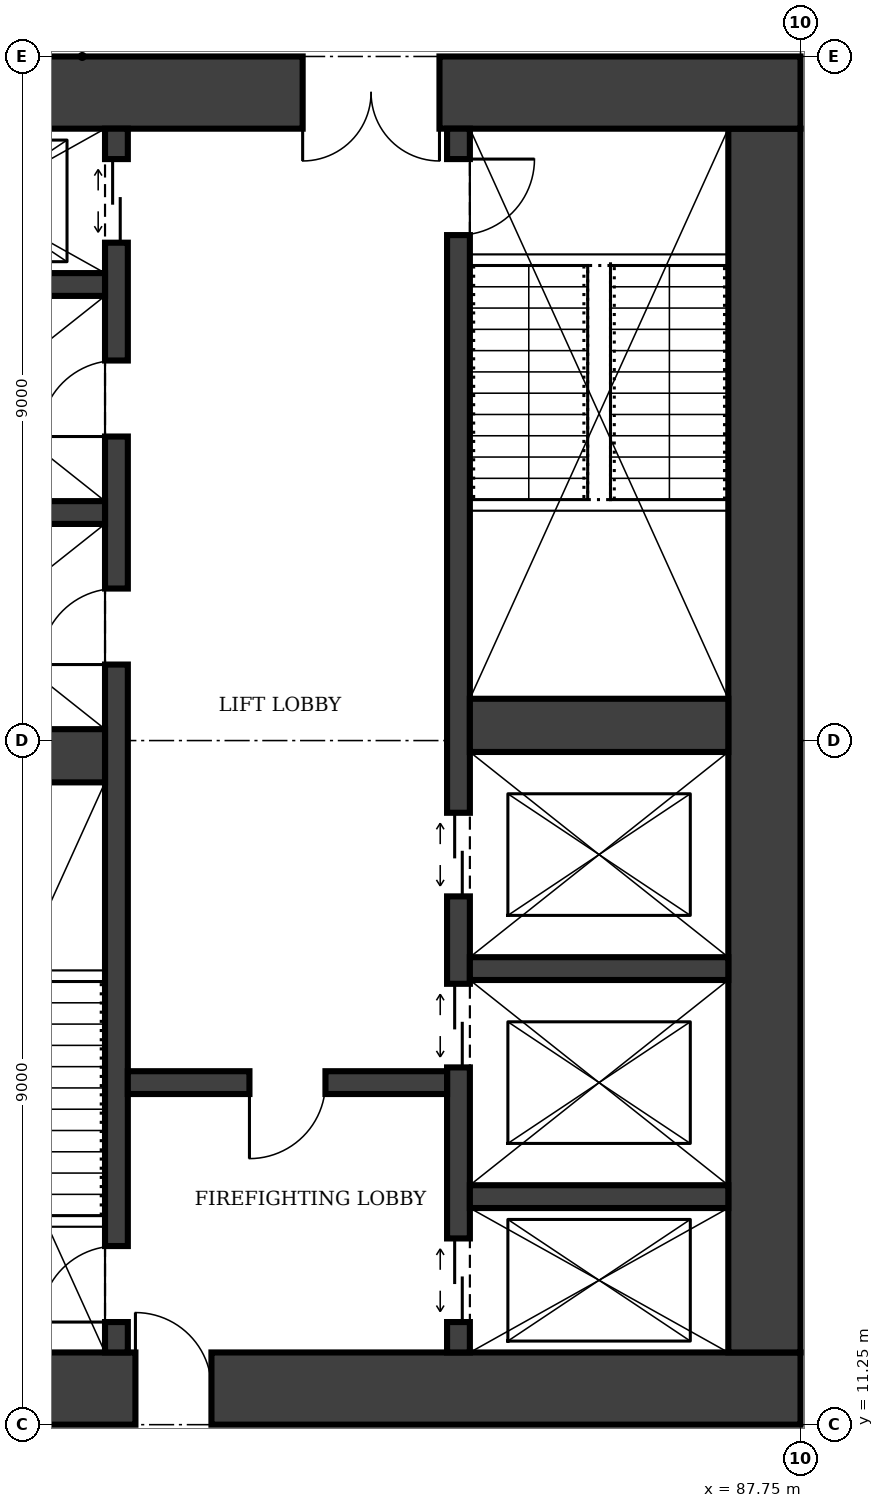
"""IFC4 building model, lengths in metres.
Left out: names, types, materials, properties, quantities, classifications, styles, units other than length and angle.
Written with IfcOpenShell. Run it as: python <this file> out.ifc"""

import sys

from ifc_helpers import new_model, si_unit, direction, frame, frame_2d, origin, place, context, subcontext, project, spatial, rectangle, extrude, element, fill, save


model = new_model("IFC4")
c1 = context("Model", 3, precision=1e-05, world=origin(), true_north=direction((0.0, 1.0)))
c2 = subcontext(c1, "Body", "Model", "MODEL_VIEW")
j1 = project(units=[si_unit("LENGTHUNIT", "METRE"), si_unit("PLANEANGLEUNIT", "RADIAN")], contexts=[c1])
p1 = place(None, origin())
s1 = spatial("IfcSite", under=j1, at=p1, CompositionType="ELEMENT")
p2 = place(p1, origin())
s2 = spatial("IfcBuilding", under=s1, at=p2, CompositionType="ELEMENT")
p3 = place(p2, frame((0.0, 0.0, 217.0)))
s3 = spatial("IfcBuildingStorey", under=s2, at=p3, CompositionType="ELEMENT", Elevation=217.0)
p4 = place(p3, frame((74.25, 11.725, 0.0), z_axis=(0.0, 0.0, 1.0), x_axis=(1.0, 0.0, 0.0)))
e1 = element("IfcWall", 1, at=p4, inside=s3, PredefinedType="SHEAR", context=c2, shape_type="SweptSolid", body=[
    extrude(rectangle(XDim=13.5, YDim=0.95, at=frame_2d((6.75, 0.0))), origin(), (0.0, 0.0, 1.0), 4.0),
])
p5 = place(p4, frame((4.75, 0.0, 0.0)))
e2 = element("IfcOpeningElement", 2, at=p5, cuts=e1, PredefinedType="OPENING", context=c2, shape_type="SweptSolid", body=[
    extrude(rectangle(XDim=1.0, YDim=2.1, at=frame_2d((0.5, 1.05))), frame((0.0, 0.485, 0.0), z_axis=(0.0, -1.0, 0.0), x_axis=(1.0, 0.0, 0.0)), (0.0, 0.0, 1.0), 0.97),
])
p6 = place(p3, frame((87.275, 12.2, 0.0), z_axis=(0.0, 0.0, 1.0), x_axis=(0.0, 1.0, 0.0)))
e3 = element("IfcWall", 3, at=p6, inside=s3, PredefinedType="SHEAR", context=c2, shape_type="SweptSolid", body=[
    extrude(rectangle(XDim=16.1, YDim=0.95, at=frame_2d((8.05, 0.0))), origin(), (0.0, 0.0, 1.0), 4.0),
])
p7 = place(p3, frame((87.75, 28.775, 0.0), z_axis=(0.0, 0.0, 1.0), x_axis=(-1.0, 0.0, 0.0)))
e4 = element("IfcWall", 4, at=p7, inside=s3, PredefinedType="SHEAR", context=c2, shape_type="SweptSolid", body=[
    extrude(rectangle(XDim=13.5, YDim=0.95, at=frame_2d((6.75, 0.0))), origin(), (0.0, 0.0, 1.0), 4.0),
])
p8 = place(p7, frame((4.75, 0.0, 0.0)))
e5 = element("IfcOpeningElement", 5, at=p8, cuts=e4, PredefinedType="OPENING", context=c2, shape_type="SweptSolid", body=[
    extrude(rectangle(XDim=1.8, YDim=2.1, at=frame_2d((0.9, 1.05))), frame((0.0, 0.485, 0.0), z_axis=(0.0, -1.0, 0.0), x_axis=(1.0, 0.0, 0.0)), (0.0, 0.0, 1.0), 0.97),
])
p9 = place(p3, frame((78.75, 12.2, 0.0), z_axis=(0.0, 0.0, 1.0), x_axis=(0.0, 1.0, 0.0)))
e6 = element("IfcWall", 6, at=p9, inside=s3, PredefinedType="SHEAR", context=c2, shape_type="SweptSolid", body=[
    extrude(rectangle(XDim=16.1, YDim=0.3, at=frame_2d((8.05, 0.0))), origin(), (0.0, 0.0, 1.0), 4.0),
])
p10 = place(p9, frame((0.4, 0.0, 0.0)))
e7 = element("IfcOpeningElement", 7, at=p10, cuts=e6, PredefinedType="OPENING", context=c2, shape_type="SweptSolid", body=[
    extrude(rectangle(XDim=1.0, YDim=2.1, at=frame_2d((0.5, 1.05))), frame((0.0, 0.16, 0.0), z_axis=(0.0, -1.0, 0.0), x_axis=(1.0, 0.0, 0.0)), (0.0, 0.0, 1.0), 0.32),
])
p11 = place(p9, frame((14.6, 0.0, 0.0)))
e8 = element("IfcOpeningElement", 8, at=p11, cuts=e6, PredefinedType="OPENING", context=c2, shape_type="SweptSolid", body=[
    extrude(rectangle(XDim=1.1, YDim=2.1, at=frame_2d((0.55, 1.05))), frame((0.0, 0.16, 0.0), z_axis=(0.0, -1.0, 0.0), x_axis=(1.0, 0.0, 0.0)), (0.0, 0.0, 1.0), 0.32),
])
p12 = place(p9, frame((9.05, 0.0, 0.0)))
e9 = element("IfcOpeningElement", 9, at=p12, cuts=e6, PredefinedType="OPENING", context=c2, shape_type="SweptSolid", body=[
    extrude(rectangle(XDim=1.0, YDim=2.1, at=frame_2d((0.5, 1.05))), frame((0.0, 0.16, 0.0), z_axis=(0.0, -1.0, 0.0), x_axis=(1.0, 0.0, 0.0)), (0.0, 0.0, 1.0), 0.32),
])
p13 = place(p9, frame((12.05, 0.0, 0.0)))
e10 = element("IfcOpeningElement", 10, at=p13, cuts=e6, PredefinedType="OPENING", context=c2, shape_type="SweptSolid", body=[
    extrude(rectangle(XDim=1.0, YDim=2.1, at=frame_2d((0.5, 1.05))), frame((0.0, 0.16, 0.0), z_axis=(0.0, -1.0, 0.0), x_axis=(1.0, 0.0, 0.0)), (0.0, 0.0, 1.0), 0.32),
])
p14 = place(p3, frame((83.25, 12.2, 0.0), z_axis=(0.0, 0.0, 1.0), x_axis=(0.0, 1.0, 0.0)))
e11 = element("IfcWall", 11, at=p14, inside=s3, PredefinedType="SHEAR", context=c2, shape_type="SweptSolid", body=[
    extrude(rectangle(XDim=16.1, YDim=0.3, at=frame_2d((8.05, 0.0))), origin(), (0.0, 0.0, 1.0), 4.0),
])
p15 = place(p14, frame((14.7, 0.0, 0.0)))
e12 = element("IfcOpeningElement", 12, at=p15, cuts=e11, PredefinedType="OPENING", context=c2, shape_type="SweptSolid", body=[
    extrude(rectangle(XDim=1.0, YDim=2.1, at=frame_2d((0.5, 1.05))), frame((0.0, 0.16, 0.0), z_axis=(0.0, -1.0, 0.0), x_axis=(1.0, 0.0, 0.0)), (0.0, 0.0, 1.0), 0.32),
])
p16 = place(p14, frame((0.4, 0.0, 0.0)))
e13 = element("IfcOpeningElement", 13, at=p16, cuts=e11, PredefinedType="OPENING", context=c2, shape_type="SweptSolid", body=[
    extrude(rectangle(XDim=1.1, YDim=2.1, at=frame_2d((0.55, 1.05))), frame((0.0, 0.16, 0.0), z_axis=(0.0, -1.0, 0.0), x_axis=(1.0, 0.0, 0.0)), (0.0, 0.0, 1.0), 0.32),
])
p17 = place(p14, frame((3.75, 0.0, 0.0)))
e14 = element("IfcOpeningElement", 14, at=p17, cuts=e11, PredefinedType="OPENING", context=c2, shape_type="SweptSolid", body=[
    extrude(rectangle(XDim=1.1, YDim=2.1, at=frame_2d((0.55, 1.05))), frame((0.0, 0.16, 0.0), z_axis=(0.0, -1.0, 0.0), x_axis=(1.0, 0.0, 0.0)), (0.0, 0.0, 1.0), 0.32),
])
p18 = place(p14, frame((6.0, 0.0, 0.0)))
e15 = element("IfcOpeningElement", 15, at=p18, cuts=e11, PredefinedType="OPENING", context=c2, shape_type="SweptSolid", body=[
    extrude(rectangle(XDim=1.1, YDim=2.1, at=frame_2d((0.55, 1.05))), frame((0.0, 0.16, 0.0), z_axis=(0.0, -1.0, 0.0), x_axis=(1.0, 0.0, 0.0)), (0.0, 0.0, 1.0), 0.32),
])
p19 = place(p3, frame((75.2, 20.05, 0.0), z_axis=(0.0, 0.0, 1.0), x_axis=(1.0, 0.0, 0.0)))
e16 = element("IfcWall", 16, at=p19, inside=s3, PredefinedType="SHEAR", context=c2, shape_type="SweptSolid", body=[
    extrude(rectangle(XDim=3.4, YDim=0.7, at=frame_2d((1.7, 0.0))), origin(), (0.0, 0.0, 1.0), 4.0),
])
p20 = place(p3, frame((78.9, 15.75, 0.0), z_axis=(0.0, 0.0, 1.0), x_axis=(1.0, 0.0, 0.0)))
e17 = element("IfcWall", 17, at=p20, inside=s3, PredefinedType="SHEAR", context=c2, shape_type="SweptSolid", body=[
    extrude(rectangle(XDim=4.2, YDim=0.3, at=frame_2d((2.1, 0.0))), origin(), (0.0, 0.0, 1.0), 4.0),
])
p21 = place(p20, frame((1.6, 0.0, 0.0)))
e18 = element("IfcOpeningElement", 18, at=p21, cuts=e17, PredefinedType="OPENING", context=c2, shape_type="SweptSolid", body=[
    extrude(rectangle(XDim=1.0, YDim=2.1, at=frame_2d((0.5, 1.05))), frame((0.0, 0.16, 0.0), z_axis=(0.0, -1.0, 0.0), x_axis=(1.0, 0.0, 0.0)), (0.0, 0.0, 1.0), 0.32),
])
for number, where, z_axis, x_axis in (
    (19, (83.4, 14.25, 0.0), (0.0, 0.0, 1.0), (1.0, 0.0, 0.0)),
    (20, (83.4, 17.25, 0.0), (0.0, 0.0, 1.0), (1.0, 0.0, 0.0)),
):
    element("IfcWall", number, at=place(p3, frame(where, z_axis=z_axis, x_axis=x_axis)), inside=s3, PredefinedType="SHEAR", context=c2, shape_type="SweptSolid", body=[
        extrude(rectangle(XDim=3.4, YDim=0.3, at=frame_2d((1.7, 0.0))), origin(), (0.0, 0.0, 1.0), 4.0),
    ])
p22 = place(p3, frame((83.4, 20.45, 0.0), z_axis=(0.0, 0.0, 1.0), x_axis=(1.0, 0.0, 0.0)))
e21 = element("IfcWall", 21, at=p22, inside=s3, PredefinedType="SHEAR", context=c2, shape_type="SweptSolid", body=[
    extrude(rectangle(XDim=3.4, YDim=0.7, at=frame_2d((1.7, 0.0))), origin(), (0.0, 0.0, 1.0), 4.0),
])
for number, where, z_axis, x_axis in (
    (22, (75.2, 23.25, 0.0), (0.0, 0.0, 1.0), (1.0, 0.0, 0.0)),
    (23, (75.2, 26.25, 0.0), (0.0, 0.0, 1.0), (1.0, 0.0, 0.0)),
):
    element("IfcWall", number, at=place(p3, frame(where, z_axis=z_axis, x_axis=x_axis)), inside=s3, PredefinedType="SHEAR", context=c2, shape_type="SweptSolid", body=[
        extrude(rectangle(XDim=3.4, YDim=0.3, at=frame_2d((1.7, 0.0))), origin(), (0.0, 0.0, 1.0), 4.0),
    ])
p23 = place(p5, origin())
e24 = element("IfcDoor", 24, at=p23, inside=s3, OperationType="SINGLE_SWING_LEFT", PredefinedType="DOOR", context=c2, shape_type="SweptSolid", body=[
    extrude(rectangle(XDim=1.0, YDim=2.1, at=frame_2d((0.5, 1.05))), frame((0.0, 0.025, 0.0), z_axis=(0.0, -1.0, 0.0), x_axis=(1.0, 0.0, 0.0)), (0.0, 0.0, 1.0), 0.05),
])
fill(e2, e24)
p24 = place(p8, origin())
e25 = element("IfcDoor", 25, at=p24, inside=s3, OperationType="DOUBLE_DOOR_SINGLE_SWING", PredefinedType="DOOR", context=c2, shape_type="SweptSolid", body=[
    extrude(rectangle(XDim=1.8, YDim=2.1, at=frame_2d((0.9, 1.05))), frame((0.0, 0.025, 0.0), z_axis=(0.0, -1.0, 0.0), x_axis=(1.0, 0.0, 0.0)), (0.0, 0.0, 1.0), 0.05),
])
fill(e5, e25)
p25 = place(p21, frame((1.0, 0.0, 0.0), z_axis=(0.0, 0.0, 1.0), x_axis=(-1.0, 0.0, 0.0)))
e26 = element("IfcDoor", 26, at=p25, inside=s3, OperationType="SINGLE_SWING_RIGHT", PredefinedType="DOOR", context=c2, shape_type="SweptSolid", body=[
    extrude(rectangle(XDim=1.0, YDim=2.1, at=frame_2d((0.5, 1.05))), frame((0.0, 0.025, 0.0), z_axis=(0.0, -1.0, 0.0), x_axis=(1.0, 0.0, 0.0)), (0.0, 0.0, 1.0), 0.05),
])
fill(e18, e26)
p26 = place(p10, origin())
e27 = element("IfcDoor", 27, at=p26, inside=s3, OperationType="SINGLE_SWING_LEFT", PredefinedType="DOOR", context=c2, shape_type="SweptSolid", body=[
    extrude(rectangle(XDim=1.0, YDim=2.1, at=frame_2d((0.5, 1.05))), frame((0.0, 0.025, 0.0), z_axis=(0.0, -1.0, 0.0), x_axis=(1.0, 0.0, 0.0)), (0.0, 0.0, 1.0), 0.05),
])
fill(e7, e27)
p27 = place(p15, frame((1.0, 0.0, 0.0), z_axis=(0.0, 0.0, 1.0), x_axis=(-1.0, 0.0, 0.0)))
e28 = element("IfcDoor", 28, at=p27, inside=s3, OperationType="SINGLE_SWING_LEFT", PredefinedType="DOOR", context=c2, shape_type="SweptSolid", body=[
    extrude(rectangle(XDim=1.0, YDim=2.1, at=frame_2d((0.5, 1.05))), frame((0.0, 0.025, 0.0), z_axis=(0.0, -1.0, 0.0), x_axis=(1.0, 0.0, 0.0)), (0.0, 0.0, 1.0), 0.05),
])
fill(e12, e28)
p28 = place(p16, origin())
e29 = element("IfcDoor", 29, at=p28, inside=s3, OperationType="DOUBLE_DOOR_SLIDING", PredefinedType="DOOR", context=c2, shape_type="SweptSolid", body=[
    extrude(rectangle(XDim=1.1, YDim=2.1, at=frame_2d((0.55, 1.05))), frame((0.0, 0.025, 0.0), z_axis=(0.0, -1.0, 0.0), x_axis=(1.0, 0.0, 0.0)), (0.0, 0.0, 1.0), 0.05),
])
fill(e13, e29)
p29 = place(p11, origin())
e30 = element("IfcDoor", 30, at=p29, inside=s3, OperationType="DOUBLE_DOOR_SLIDING", PredefinedType="DOOR", context=c2, shape_type="SweptSolid", body=[
    extrude(rectangle(XDim=1.1, YDim=2.1, at=frame_2d((0.55, 1.05))), frame((0.0, 0.025, 0.0), z_axis=(0.0, -1.0, 0.0), x_axis=(1.0, 0.0, 0.0)), (0.0, 0.0, 1.0), 0.05),
])
fill(e8, e30)
p30 = place(p17, origin())
e31 = element("IfcDoor", 31, at=p30, inside=s3, OperationType="DOUBLE_DOOR_SLIDING", PredefinedType="DOOR", context=c2, shape_type="SweptSolid", body=[
    extrude(rectangle(XDim=1.1, YDim=2.1, at=frame_2d((0.55, 1.05))), frame((0.0, 0.025, 0.0), z_axis=(0.0, -1.0, 0.0), x_axis=(1.0, 0.0, 0.0)), (0.0, 0.0, 1.0), 0.05),
])
fill(e14, e31)
p31 = place(p18, origin())
e32 = element("IfcDoor", 32, at=p31, inside=s3, OperationType="DOUBLE_DOOR_SLIDING", PredefinedType="DOOR", context=c2, shape_type="SweptSolid", body=[
    extrude(rectangle(XDim=1.1, YDim=2.1, at=frame_2d((0.55, 1.05))), frame((0.0, 0.025, 0.0), z_axis=(0.0, -1.0, 0.0), x_axis=(1.0, 0.0, 0.0)), (0.0, 0.0, 1.0), 0.05),
])
fill(e15, e32)
p32 = place(p12, origin())
e33 = element("IfcDoor", 33, at=p32, inside=s3, OperationType="SINGLE_SWING_LEFT", PredefinedType="DOOR", context=c2, shape_type="SweptSolid", body=[
    extrude(rectangle(XDim=1.0, YDim=2.1, at=frame_2d((0.5, 1.05))), frame((0.0, 0.025, 0.0), z_axis=(0.0, -1.0, 0.0), x_axis=(1.0, 0.0, 0.0)), (0.0, 0.0, 1.0), 0.05),
])
fill(e9, e33)
p33 = place(p13, origin())
e34 = element("IfcDoor", 34, at=p33, inside=s3, OperationType="SINGLE_SWING_LEFT", PredefinedType="DOOR", context=c2, shape_type="SweptSolid", body=[
    extrude(rectangle(XDim=1.0, YDim=2.1, at=frame_2d((0.5, 1.05))), frame((0.0, 0.025, 0.0), z_axis=(0.0, -1.0, 0.0), x_axis=(1.0, 0.0, 0.0)), (0.0, 0.0, 1.0), 0.05),
])
fill(e10, e34)
save(model, sys.argv[1])
